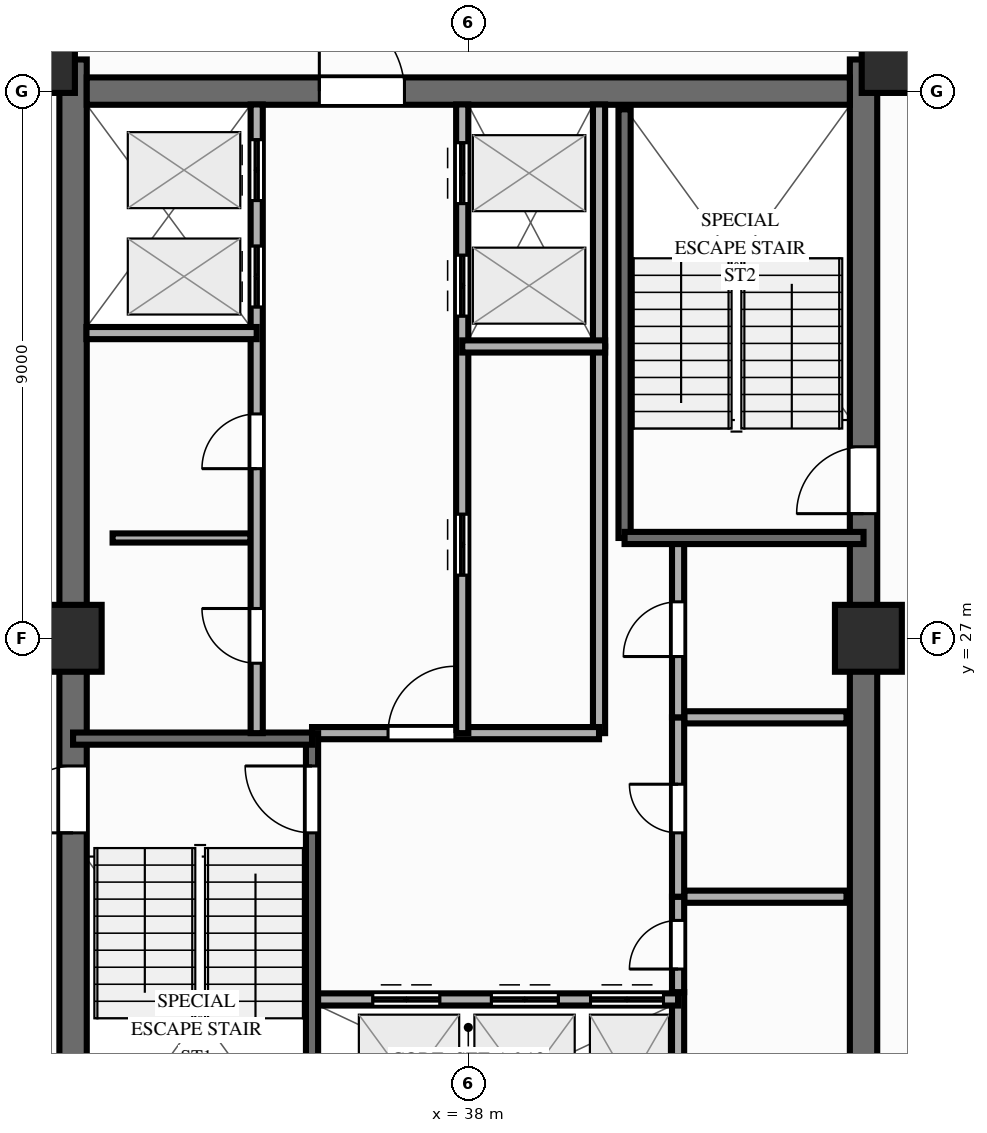
"""IFC4 building model, lengths in metres.
Left out: names, types, materials, properties, quantities, classifications, styles, units other than length and angle.
Written with IfcOpenShell. Run it as: python <this file> out.ifc"""

import sys

from ifc_helpers import new_model, si_unit, direction, frame, frame_2d, origin, origin_2d, place, context, subcontext, project, spatial, rectangle, extrude, source, transform, mapped, element, fill, save


model = new_model("IFC4")
c1 = context("Model", 3, precision=1e-05, world=origin(), true_north=direction((0.0, 1.0)))
c2 = subcontext(c1, "Body", "Model", "MODEL_VIEW")
j1 = project(units=[si_unit("LENGTHUNIT", "METRE"), si_unit("PLANEANGLEUNIT", "RADIAN")], contexts=[c1])
p1 = place(None, origin())
s1 = spatial("IfcSite", under=j1, at=p1, CompositionType="ELEMENT")
p2 = place(p1, origin())
s2 = spatial("IfcBuilding", under=s1, at=p2, CompositionType="ELEMENT")
p3 = place(p2, frame((0.0, 0.0, 172.9)))
s3 = spatial("IfcBuildingStorey", under=s2, at=p3, CompositionType="ELEMENT", Elevation=172.9)
p4 = place(p3, frame((31.5, 17.48, 0.0), z_axis=(0.0, 0.0, 1.0), x_axis=(0.0, 1.0, 0.0)))
e1 = element("IfcWall", 1, at=p4, inside=s3, PredefinedType="SHEAR", context=c2, shape_type="SweptSolid", body=[
    extrude(rectangle(XDim=19.04, YDim=0.45, at=frame_2d((9.52, 0.0))), origin(), (0.0, 0.0, 1.0), 3.9),
])
p5 = place(p4, frame((6.32, 0.0, 0.0)))
e2 = element("IfcOpeningElement", 2, at=p5, cuts=e1, PredefinedType="OPENING", context=c2, shape_type="SweptSolid", body=[
    extrude(rectangle(XDim=1.1, YDim=2.15, at=frame_2d((0.55, 1.075))), frame((0.0, 0.237, 0.0), z_axis=(0.0, -1.0, 0.0), x_axis=(1.0, 0.0, 0.0)), (0.0, 0.0, 1.0), 0.474),
])
p6 = place(p3, frame((44.5, 17.48, 0.0), z_axis=(0.0, 0.0, 1.0), x_axis=(0.0, 1.0, 0.0)))
e3 = element("IfcWall", 3, at=p6, inside=s3, PredefinedType="SHEAR", context=c2, shape_type="SweptSolid", body=[
    extrude(rectangle(XDim=19.04, YDim=0.45, at=frame_2d((9.52, 0.0))), origin(), (0.0, 0.0, 1.0), 3.9),
])
p7 = place(p6, frame((12.67, 0.0, 0.0), z_axis=(0.0, 0.0, 1.0), x_axis=(-1.0, 0.0, 0.0)))
e4 = element("IfcOpeningElement", 4, at=p7, cuts=e3, PredefinedType="OPENING", context=c2, shape_type="SweptSolid", body=[
    extrude(rectangle(XDim=1.1, YDim=2.15, at=frame_2d((0.55, 1.075))), frame((0.0, 0.237, 0.0), z_axis=(0.0, -1.0, 0.0), x_axis=(1.0, 0.0, 0.0)), (0.0, 0.0, 1.0), 0.474),
])
p8 = place(p3, frame((31.725, 36.0, 0.0), z_axis=(0.0, 0.0, 1.0), x_axis=(1.0, 0.0, 0.0)))
e5 = element("IfcWall", 5, at=p8, inside=s3, PredefinedType="SHEAR", context=c2, shape_type="SweptSolid", body=[
    extrude(rectangle(XDim=12.55, YDim=0.45, at=frame_2d((6.275, 0.0))), origin(), (0.0, 0.0, 1.0), 3.9),
])
p9 = place(p8, frame((5.225, 0.0, 0.0), z_axis=(0.0, 0.0, 1.0), x_axis=(-1.0, 0.0, 0.0)))
e6 = element("IfcOpeningElement", 6, at=p9, cuts=e5, PredefinedType="OPENING", context=c2, shape_type="SweptSolid", body=[
    extrude(rectangle(XDim=1.4, YDim=2.15, at=frame_2d((0.7, 1.075))), frame((0.0, 0.237, 0.0), z_axis=(0.0, -1.0, 0.0), x_axis=(1.0, 0.0, 0.0)), (0.0, 0.0, 1.0), 0.474),
])
m1 = source(origin(), c2, "Body", "SweptSolid", [
    extrude(rectangle(XDim=1.1, YDim=1.1, at=origin_2d()), origin(), (0.0, 0.0, 1.0), 3.9),
])
for number, where, z_axis, x_axis in (
    (7, (30.98, 36.52, 0.0), (0.0, 0.0, 1.0), (1.0, 0.0, 0.0)),
    (8, (45.02, 36.52, 0.0), (0.0, 0.0, 1.0), (1.0, 0.0, 0.0)),
    (9, (31.42, 27.0, 0.0), (0.0, 0.0, 1.0), (1.0, 0.0, 0.0)),
    (10, (44.58, 27.0, 0.0), (0.0, 0.0, 1.0), (1.0, 0.0, 0.0)),
):
    element("IfcColumn", number, at=place(p3, frame(where, z_axis=z_axis, x_axis=x_axis)), inside=s3, PredefinedType="COLUMN", context=c2, shape_type="MappedRepresentation", body=[
        mapped(m1, transform((0.0, 0.0, 0.0), scale=1.0)),
    ])
p10 = place(p3, frame((32.15, 28.65, 0.0), z_axis=(0.0, 0.0, 1.0), x_axis=(1.0, 0.0, 0.0)))
e11 = element("IfcWall", 11, at=p10, inside=s3, PredefinedType="PARTITIONING", context=c2, shape_type="SweptSolid", body=[
    extrude(rectangle(XDim=2.27, YDim=0.15, at=frame_2d((1.135, 0.0))), origin(), (0.0, 0.0, 1.0), 3.04),
])
p11 = place(p3, frame((41.55, 22.75, 0.0), z_axis=(0.0, 0.0, 1.0), x_axis=(1.0, 0.0, 0.0)))
e12 = element("IfcWall", 12, at=p11, inside=s3, PredefinedType="PARTITIONING", context=c2, shape_type="SweptSolid", body=[
    extrude(rectangle(XDim=2.67, YDim=0.2, at=frame_2d((1.335, 0.0))), origin(), (0.0, 0.0, 1.0), 3.69),
])
p12 = place(p3, frame((41.55, 25.7, 0.0), z_axis=(0.0, 0.0, 1.0), x_axis=(1.0, 0.0, 0.0)))
e13 = element("IfcWall", 13, at=p12, inside=s3, PredefinedType="PARTITIONING", context=c2, shape_type="SweptSolid", body=[
    extrude(rectangle(XDim=2.67, YDim=0.2, at=frame_2d((1.335, 0.0))), origin(), (0.0, 0.0, 1.0), 3.04),
])
p13 = place(p3, frame((41.45, 18.22, 0.0), z_axis=(0.0, 0.0, 1.0), x_axis=(0.0, 1.0, 0.0)))
e14 = element("IfcWall", 14, at=p13, inside=s3, PredefinedType="PARTITIONING", context=c2, shape_type="SweptSolid", body=[
    extrude(rectangle(XDim=2.96, YDim=0.2, at=frame_2d((1.48, 0.0))), origin(), (0.0, 0.0, 1.0), 3.69),
])
p14 = place(p3, frame((41.45, 21.18, 0.0), z_axis=(0.0, 0.0, 1.0), x_axis=(0.0, 1.0, 0.0)))
e15 = element("IfcWall", 15, at=p14, inside=s3, PredefinedType="PARTITIONING", context=c2, shape_type="SweptSolid", body=[
    extrude(rectangle(XDim=1.57, YDim=0.2, at=frame_2d((0.785, 0.0))), origin(), (0.0, 0.0, 1.0), 3.69),
])
p15 = place(p14, frame((0.38, 0.0, 0.0)))
e16 = element("IfcOpeningElement", 16, at=p15, cuts=e15, PredefinedType="OPENING", context=c2, shape_type="SweptSolid", body=[
    extrude(rectangle(XDim=0.8, YDim=2.05, at=frame_2d((0.4, 1.025))), frame((0.0, 0.112, 0.0), z_axis=(0.0, -1.0, 0.0), x_axis=(1.0, 0.0, 0.0)), (0.0, 0.0, 1.0), 0.224),
])
p16 = place(p3, frame((41.45, 22.75, 0.0), z_axis=(0.0, 0.0, 1.0), x_axis=(0.0, 1.0, 0.0)))
e17 = element("IfcWall", 17, at=p16, inside=s3, PredefinedType="PARTITIONING", context=c2, shape_type="SweptSolid", body=[
    extrude(rectangle(XDim=2.95, YDim=0.2, at=frame_2d((1.475, 0.0))), origin(), (0.0, 0.0, 1.0), 3.69),
])
p17 = place(p16, frame((1.05, 0.0, 0.0)))
e18 = element("IfcOpeningElement", 18, at=p17, cuts=e17, PredefinedType="OPENING", context=c2, shape_type="SweptSolid", body=[
    extrude(rectangle(XDim=0.8, YDim=2.05, at=frame_2d((0.4, 1.025))), frame((0.0, 0.112, 0.0), z_axis=(0.0, -1.0, 0.0), x_axis=(1.0, 0.0, 0.0)), (0.0, 0.0, 1.0), 0.224),
])
p18 = place(p3, frame((41.45, 25.7, 0.0), z_axis=(0.0, 0.0, 1.0), x_axis=(0.0, 1.0, 0.0)))
e19 = element("IfcWall", 19, at=p18, inside=s3, PredefinedType="PARTITIONING", context=c2, shape_type="SweptSolid", body=[
    extrude(rectangle(XDim=2.9, YDim=0.2, at=frame_2d((1.45, 0.0))), origin(), (0.0, 0.0, 1.0), 3.69),
])
p19 = place(p18, frame((1.0, 0.0, 0.0)))
e20 = element("IfcOpeningElement", 20, at=p19, cuts=e19, PredefinedType="OPENING", context=c2, shape_type="SweptSolid", body=[
    extrude(rectangle(XDim=0.9, YDim=2.1, at=frame_2d((0.45, 1.05))), frame((0.0, 0.112, 0.0), z_axis=(0.0, -1.0, 0.0), x_axis=(1.0, 0.0, 0.0)), (0.0, 0.0, 1.0), 0.224),
])
p20 = place(p3, frame((40.15, 25.44, 0.0), z_axis=(0.0, 0.0, 1.0), x_axis=(0.0, 1.0, 0.0)))
e21 = element("IfcWall", 21, at=p20, inside=s3, PredefinedType="PARTITIONING", context=c2, shape_type="SweptSolid", body=[
    extrude(rectangle(XDim=6.36, YDim=0.2, at=frame_2d((3.18, 0.0))), origin(), (0.0, 0.0, 1.0), 3.69),
])
p21 = place(p3, frame((40.15, 31.8, 0.0), z_axis=(0.0, 0.0, 1.0), x_axis=(0.0, 1.0, 0.0)))
e22 = element("IfcWall", 22, at=p21, inside=s3, PredefinedType="PARTITIONING", context=c2, shape_type="SweptSolid", body=[
    extrude(rectangle(XDim=3.98, YDim=0.2, at=frame_2d((1.99, 0.0))), origin(), (0.0, 0.0, 1.0), 3.69),
])
p22 = place(p3, frame((35.43, 21.06, 0.0), z_axis=(0.0, 0.0, 1.0), x_axis=(1.0, 0.0, 0.0)))
e23 = element("IfcWall", 23, at=p22, inside=s3, PredefinedType="PARTITIONING", context=c2, shape_type="SweptSolid", body=[
    extrude(rectangle(XDim=6.02, YDim=0.2, at=frame_2d((3.01, 0.0))), origin(), (0.0, 0.0, 1.0), 3.69),
])
p23 = place(p22, frame((1.0, 0.0, 0.0)))
e24 = element("IfcOpeningElement", 24, at=p23, cuts=e23, PredefinedType="OPENING", context=c2, shape_type="SweptSolid", body=[
    extrude(rectangle(XDim=1.1, YDim=2.15, at=frame_2d((0.55, 1.075))), frame((0.0, 0.112, 0.0), z_axis=(0.0, -1.0, 0.0), x_axis=(1.0, 0.0, 0.0)), (0.0, 0.0, 1.0), 0.224),
])
p24 = place(p22, frame((2.95, 0.0, 0.0)))
e25 = element("IfcOpeningElement", 25, at=p24, cuts=e23, PredefinedType="OPENING", context=c2, shape_type="SweptSolid", body=[
    extrude(rectangle(XDim=1.1, YDim=2.15, at=frame_2d((0.55, 1.075))), frame((0.0, 0.112, 0.0), z_axis=(0.0, -1.0, 0.0), x_axis=(1.0, 0.0, 0.0)), (0.0, 0.0, 1.0), 0.224),
])
p25 = place(p22, frame((4.58, 0.0, 0.0)))
e26 = element("IfcOpeningElement", 26, at=p25, cuts=e23, PredefinedType="OPENING", context=c2, shape_type="SweptSolid", body=[
    extrude(rectangle(XDim=1.2, YDim=2.15, at=frame_2d((0.6, 1.075))), frame((0.0, 0.112, 0.0), z_axis=(0.0, -1.0, 0.0), x_axis=(1.0, 0.0, 0.0)), (0.0, 0.0, 1.0), 0.224),
])
p26 = place(p3, frame((35.43, 25.44, 0.0), z_axis=(0.0, 0.0, 1.0), x_axis=(1.0, 0.0, 0.0)))
e27 = element("IfcWall", 27, at=p26, inside=s3, PredefinedType="PARTITIONING", context=c2, shape_type="SweptSolid", body=[
    extrude(rectangle(XDim=4.72, YDim=0.2, at=frame_2d((2.36, 0.0))), origin(), (0.0, 0.0, 1.0), 3.69),
])
p27 = place(p26, frame((1.25, 0.0, 0.0)))
e28 = element("IfcOpeningElement", 28, at=p27, cuts=e27, PredefinedType="OPENING", context=c2, shape_type="SweptSolid", body=[
    extrude(rectangle(XDim=1.1, YDim=2.15, at=frame_2d((0.55, 1.075))), frame((0.0, 0.112, 0.0), z_axis=(0.0, -1.0, 0.0), x_axis=(1.0, 0.0, 0.0)), (0.0, 0.0, 1.0), 0.224),
])
p28 = place(p3, frame((35.43, 18.22, 0.0), z_axis=(0.0, 0.0, 1.0), x_axis=(0.0, 1.0, 0.0)))
e29 = element("IfcWall", 29, at=p28, inside=s3, PredefinedType="SOLIDWALL", context=c2, shape_type="SweptSolid", body=[
    extrude(rectangle(XDim=7.22, YDim=0.2, at=frame_2d((3.61, 0.0))), origin(), (0.0, 0.0, 1.0), 3.69),
])
p29 = place(p28, frame((6.68, 0.0, 0.0), z_axis=(0.0, 0.0, 1.0), x_axis=(-1.0, 0.0, 0.0)))
e30 = element("IfcOpeningElement", 30, at=p29, cuts=e29, PredefinedType="OPENING", context=c2, shape_type="SweptSolid", body=[
    extrude(rectangle(XDim=1.1, YDim=2.15, at=frame_2d((0.55, 1.075))), frame((0.0, 0.112, 0.0), z_axis=(0.0, -1.0, 0.0), x_axis=(1.0, 0.0, 0.0)), (0.0, 0.0, 1.0), 0.224),
])
p30 = place(p3, frame((31.5, 25.35, 0.0), z_axis=(0.0, 0.0, 1.0), x_axis=(1.0, 0.0, 0.0)))
e31 = element("IfcWall", 31, at=p30, inside=s3, PredefinedType="SOLIDWALL", context=c2, shape_type="SweptSolid", body=[
    extrude(rectangle(XDim=3.93, YDim=0.2, at=frame_2d((1.965, 0.0))), origin(), (0.0, 0.0, 1.0), 3.69),
])
p31 = place(p3, frame((40.57, 28.65, 0.0), z_axis=(0.0, 0.0, 1.0), x_axis=(0.0, 1.0, 0.0)))
e32 = element("IfcWall", 32, at=p31, inside=s3, PredefinedType="SOLIDWALL", context=c2, shape_type="SweptSolid", body=[
    extrude(rectangle(XDim=7.05, YDim=0.2, at=frame_2d((3.525, 0.0))), origin(), (0.0, 0.0, 1.0), 3.69),
])
p32 = place(p3, frame((40.57, 28.65, 0.0), z_axis=(0.0, 0.0, 1.0), x_axis=(1.0, 0.0, 0.0)))
e33 = element("IfcWall", 33, at=p32, inside=s3, PredefinedType="SOLIDWALL", context=c2, shape_type="SweptSolid", body=[
    extrude(rectangle(XDim=3.93, YDim=0.2, at=frame_2d((1.965, 0.0))), origin(), (0.0, 0.0, 1.0), 3.69),
])
p33 = place(p3, frame((34.52, 25.44, 0.0), z_axis=(0.0, 0.0, 1.0), x_axis=(0.0, 1.0, 0.0)))
e34 = element("IfcWall", 34, at=p33, inside=s3, PredefinedType="PARTITIONING", context=c2, shape_type="SweptSolid", body=[
    extrude(rectangle(XDim=10.34, YDim=0.2, at=frame_2d((5.17, 0.0))), origin(), (0.0, 0.0, 1.0), 3.69),
])
p34 = place(p33, frame((1.15, 0.0, 0.0)))
e35 = element("IfcOpeningElement", 35, at=p34, cuts=e34, PredefinedType="OPENING", context=c2, shape_type="SweptSolid", body=[
    extrude(rectangle(XDim=0.9, YDim=2.1, at=frame_2d((0.45, 1.05))), frame((0.0, 0.112, 0.0), z_axis=(0.0, -1.0, 0.0), x_axis=(1.0, 0.0, 0.0)), (0.0, 0.0, 1.0), 0.224),
])
p35 = place(p33, frame((4.35, 0.0, 0.0)))
e36 = element("IfcOpeningElement", 36, at=p35, cuts=e34, PredefinedType="OPENING", context=c2, shape_type="SweptSolid", body=[
    extrude(rectangle(XDim=0.9, YDim=2.1, at=frame_2d((0.45, 1.05))), frame((0.0, 0.112, 0.0), z_axis=(0.0, -1.0, 0.0), x_axis=(1.0, 0.0, 0.0)), (0.0, 0.0, 1.0), 0.224),
])
p36 = place(p33, frame((7.01, 0.0, 0.0)))
e37 = element("IfcOpeningElement", 37, at=p36, cuts=e34, PredefinedType="OPENING", context=c2, shape_type="SweptSolid", body=[
    extrude(rectangle(XDim=1.0, YDim=2.15, at=frame_2d((0.5, 1.075))), frame((0.0, 0.112, 0.0), z_axis=(0.0, -1.0, 0.0), x_axis=(1.0, 0.0, 0.0)), (0.0, 0.0, 1.0), 0.224),
])
p37 = place(p33, frame((8.76, 0.0, 0.0)))
e38 = element("IfcOpeningElement", 38, at=p37, cuts=e34, PredefinedType="OPENING", context=c2, shape_type="SweptSolid", body=[
    extrude(rectangle(XDim=1.0, YDim=2.15, at=frame_2d((0.5, 1.075))), frame((0.0, 0.112, 0.0), z_axis=(0.0, -1.0, 0.0), x_axis=(1.0, 0.0, 0.0)), (0.0, 0.0, 1.0), 0.224),
])
p38 = place(p3, frame((31.72, 32.02, 0.0), z_axis=(0.0, 0.0, 1.0), x_axis=(1.0, 0.0, 0.0)))
e39 = element("IfcWall", 39, at=p38, inside=s3, PredefinedType="PARTITIONING", context=c2, shape_type="SweptSolid", body=[
    extrude(rectangle(XDim=2.8, YDim=0.2, at=frame_2d((1.4, 0.0))), origin(), (0.0, 0.0, 1.0), 3.69),
])
p39 = place(p3, frame((37.9, 25.44, 0.0), z_axis=(0.0, 0.0, 1.0), x_axis=(0.0, 1.0, 0.0)))
e40 = element("IfcWall", 40, at=p39, inside=s3, PredefinedType="PARTITIONING", context=c2, shape_type="SweptSolid", body=[
    extrude(rectangle(XDim=10.34, YDim=0.2, at=frame_2d((5.17, 0.0))), origin(), (0.0, 0.0, 1.0), 3.69),
])
p40 = place(p39, frame((2.6, 0.0, 0.0)))
e41 = element("IfcOpeningElement", 41, at=p40, cuts=e40, PredefinedType="OPENING", context=c2, shape_type="SweptSolid", body=[
    extrude(rectangle(XDim=1.0, YDim=2.15, at=frame_2d((0.5, 1.075))), frame((0.0, 0.112, 0.0), z_axis=(0.0, -1.0, 0.0), x_axis=(1.0, 0.0, 0.0)), (0.0, 0.0, 1.0), 0.224),
])
p41 = place(p39, frame((6.86, 0.0, 0.0)))
e42 = element("IfcOpeningElement", 42, at=p41, cuts=e40, PredefinedType="OPENING", context=c2, shape_type="SweptSolid", body=[
    extrude(rectangle(XDim=1.0, YDim=2.15, at=frame_2d((0.5, 1.075))), frame((0.0, 0.112, 0.0), z_axis=(0.0, -1.0, 0.0), x_axis=(1.0, 0.0, 0.0)), (0.0, 0.0, 1.0), 0.224),
])
p42 = place(p39, frame((8.71, 0.0, 0.0)))
e43 = element("IfcOpeningElement", 43, at=p42, cuts=e40, PredefinedType="OPENING", context=c2, shape_type="SweptSolid", body=[
    extrude(rectangle(XDim=1.0, YDim=2.15, at=frame_2d((0.5, 1.075))), frame((0.0, 0.112, 0.0), z_axis=(0.0, -1.0, 0.0), x_axis=(1.0, 0.0, 0.0)), (0.0, 0.0, 1.0), 0.224),
])
p43 = place(p3, frame((37.9, 31.8, 0.0), z_axis=(0.0, 0.0, 1.0), x_axis=(1.0, 0.0, 0.0)))
e44 = element("IfcWall", 44, at=p43, inside=s3, PredefinedType="PARTITIONING", context=c2, shape_type="SweptSolid", body=[
    extrude(rectangle(XDim=2.35, YDim=0.2, at=frame_2d((1.175, 0.0))), origin(), (0.0, 0.0, 1.0), 3.69),
])
m2 = source(origin(), c2, "Body", "SweptSolid", [
    extrude(rectangle(XDim=1.1, YDim=2.15, at=frame_2d((0.55, 1.075))), frame((0.0, 0.025, 0.0), z_axis=(0.0, -1.0, 0.0), x_axis=(1.0, 0.0, 0.0)), (0.0, 0.0, 1.0), 0.05),
])
p44 = place(p5, origin())
e45 = element("IfcDoor", 45, at=p44, inside=s3, OperationType="SINGLE_SWING_LEFT", PredefinedType="DOOR", context=c2, shape_type="MappedRepresentation", body=[
    mapped(m2, transform((0.0, 0.0, 0.0), scale=1.0)),
])
fill(e2, e45)
p45 = place(p7, origin())
e46 = element("IfcDoor", 46, at=p45, inside=s3, OperationType="SINGLE_SWING_RIGHT", PredefinedType="DOOR", context=c2, shape_type="MappedRepresentation", body=[
    mapped(m2, transform((0.0, 0.0, 0.0), scale=1.0)),
])
fill(e4, e46)
m3 = source(origin(), c2, "Body", "SweptSolid", [
    extrude(rectangle(XDim=1.4, YDim=2.15, at=frame_2d((0.7, 1.075))), frame((0.0, 0.025, 0.0), z_axis=(0.0, -1.0, 0.0), x_axis=(1.0, 0.0, 0.0)), (0.0, 0.0, 1.0), 0.05),
])
p46 = place(p9, origin())
e47 = element("IfcDoor", 47, at=p46, inside=s3, OperationType="SINGLE_SWING_RIGHT", PredefinedType="DOOR", context=c2, shape_type="MappedRepresentation", body=[
    mapped(m3, transform((0.0, 0.0, 0.0), scale=1.0)),
])
fill(e6, e47)
m4 = source(origin(), c2, "Body", "SweptSolid", [
    extrude(rectangle(XDim=0.8, YDim=2.05, at=frame_2d((0.4, 1.025))), frame((0.0, 0.025, 0.0), z_axis=(0.0, -1.0, 0.0), x_axis=(1.0, 0.0, 0.0)), (0.0, 0.0, 1.0), 0.05),
])
p47 = place(p15, origin())
e48 = element("IfcDoor", 48, at=p47, inside=s3, OperationType="SINGLE_SWING_LEFT", PredefinedType="DOOR", context=c2, shape_type="MappedRepresentation", body=[
    mapped(m4, transform((0.0, 0.0, 0.0), scale=1.0)),
])
fill(e16, e48)
p48 = place(p17, origin())
e49 = element("IfcDoor", 49, at=p48, inside=s3, OperationType="SINGLE_SWING_RIGHT", PredefinedType="DOOR", context=c2, shape_type="MappedRepresentation", body=[
    mapped(m4, transform((0.0, 0.0, 0.0), scale=1.0)),
])
fill(e18, e49)
m5 = source(origin(), c2, "Body", "SweptSolid", [
    extrude(rectangle(XDim=0.9, YDim=2.1, at=frame_2d((0.45, 1.05))), frame((0.0, 0.025, 0.0), z_axis=(0.0, -1.0, 0.0), x_axis=(1.0, 0.0, 0.0)), (0.0, 0.0, 1.0), 0.05),
])
p49 = place(p19, origin())
e50 = element("IfcDoor", 50, at=p49, inside=s3, OperationType="SINGLE_SWING_LEFT", PredefinedType="DOOR", context=c2, shape_type="MappedRepresentation", body=[
    mapped(m5, transform((0.0, 0.0, 0.0), scale=1.0)),
])
fill(e20, e50)
p50 = place(p23, origin())
e51 = element("IfcDoor", 51, at=p50, inside=s3, OperationType="DOUBLE_DOOR_SLIDING", PredefinedType="DOOR", context=c2, shape_type="MappedRepresentation", body=[
    mapped(m2, transform((0.0, 0.0, 0.0), scale=1.0)),
])
fill(e24, e51)
p51 = place(p24, origin())
e52 = element("IfcDoor", 52, at=p51, inside=s3, OperationType="DOUBLE_DOOR_SLIDING", PredefinedType="DOOR", context=c2, shape_type="MappedRepresentation", body=[
    mapped(m2, transform((0.0, 0.0, 0.0), scale=1.0)),
])
fill(e25, e52)
m6 = source(origin(), c2, "Body", "SweptSolid", [
    extrude(rectangle(XDim=1.2, YDim=2.15, at=frame_2d((0.6, 1.075))), frame((0.0, 0.025, 0.0), z_axis=(0.0, -1.0, 0.0), x_axis=(1.0, 0.0, 0.0)), (0.0, 0.0, 1.0), 0.05),
])
p52 = place(p25, origin())
e53 = element("IfcDoor", 53, at=p52, inside=s3, OperationType="DOUBLE_DOOR_SLIDING", PredefinedType="DOOR", context=c2, shape_type="MappedRepresentation", body=[
    mapped(m6, transform((0.0, 0.0, 0.0), scale=1.0)),
])
fill(e26, e53)
p53 = place(p27, origin())
e54 = element("IfcDoor", 54, at=p53, inside=s3, OperationType="SINGLE_SWING_RIGHT", PredefinedType="DOOR", context=c2, shape_type="MappedRepresentation", body=[
    mapped(m2, transform((0.0, 0.0, 0.0), scale=1.0)),
])
fill(e28, e54)
p54 = place(p29, origin())
e55 = element("IfcDoor", 55, at=p54, inside=s3, OperationType="SINGLE_SWING_LEFT", PredefinedType="DOOR", context=c2, shape_type="MappedRepresentation", body=[
    mapped(m2, transform((0.0, 0.0, 0.0), scale=1.0)),
])
fill(e30, e55)
p55 = place(p34, origin())
e56 = element("IfcDoor", 56, at=p55, inside=s3, OperationType="SINGLE_SWING_RIGHT", PredefinedType="DOOR", context=c2, shape_type="MappedRepresentation", body=[
    mapped(m5, transform((0.0, 0.0, 0.0), scale=1.0)),
])
fill(e35, e56)
p56 = place(p35, origin())
e57 = element("IfcDoor", 57, at=p56, inside=s3, OperationType="SINGLE_SWING_LEFT", PredefinedType="DOOR", context=c2, shape_type="MappedRepresentation", body=[
    mapped(m5, transform((0.0, 0.0, 0.0), scale=1.0)),
])
fill(e36, e57)
m7 = source(origin(), c2, "Body", "SweptSolid", [
    extrude(rectangle(XDim=1.0, YDim=2.15, at=frame_2d((0.5, 1.075))), frame((0.0, 0.025, 0.0), z_axis=(0.0, -1.0, 0.0), x_axis=(1.0, 0.0, 0.0)), (0.0, 0.0, 1.0), 0.05),
])
p57 = place(p36, origin())
e58 = element("IfcDoor", 58, at=p57, inside=s3, OperationType="DOUBLE_DOOR_SLIDING", PredefinedType="DOOR", context=c2, shape_type="MappedRepresentation", body=[
    mapped(m7, transform((0.0, 0.0, 0.0), scale=1.0)),
])
fill(e37, e58)
p58 = place(p37, origin())
e59 = element("IfcDoor", 59, at=p58, inside=s3, OperationType="DOUBLE_DOOR_SLIDING", PredefinedType="DOOR", context=c2, shape_type="MappedRepresentation", body=[
    mapped(m7, transform((0.0, 0.0, 0.0), scale=1.0)),
])
fill(e38, e59)
p59 = place(p40, origin())
e60 = element("IfcDoor", 60, at=p59, inside=s3, OperationType="DOUBLE_DOOR_SLIDING", PredefinedType="DOOR", context=c2, shape_type="MappedRepresentation", body=[
    mapped(m7, transform((0.0, 0.0, 0.0), scale=1.0)),
])
fill(e41, e60)
p60 = place(p41, origin())
e61 = element("IfcDoor", 61, at=p60, inside=s3, OperationType="DOUBLE_DOOR_SLIDING", PredefinedType="DOOR", context=c2, shape_type="MappedRepresentation", body=[
    mapped(m7, transform((0.0, 0.0, 0.0), scale=1.0)),
])
fill(e42, e61)
p61 = place(p42, origin())
e62 = element("IfcDoor", 62, at=p61, inside=s3, OperationType="DOUBLE_DOOR_SLIDING", PredefinedType="DOOR", context=c2, shape_type="MappedRepresentation", body=[
    mapped(m7, transform((0.0, 0.0, 0.0), scale=1.0)),
])
fill(e43, e62)
save(model, sys.argv[1])
